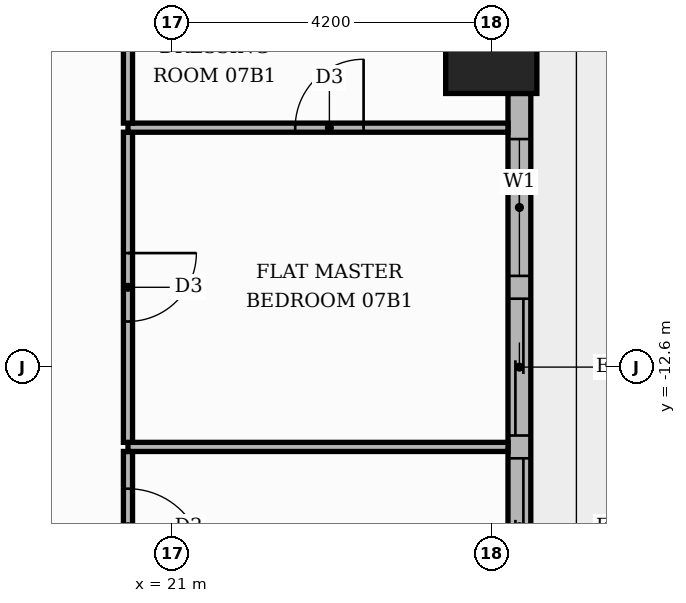
"""IFC4 building model, lengths in metres.
Left out: names, types, materials, properties, quantities, classifications, styles, units other than length and angle.
Written with IfcOpenShell. Run it as: python <this file> out.ifc"""

import sys

from ifc_helpers import new_model, si_unit, direction, frame, frame_2d, origin, origin_2d, place, context, subcontext, project, spatial, rectangle, extrude, element, fill, save


model = new_model("IFC4")
c1 = context("Model", 3, precision=1e-05, world=origin(), true_north=direction((0.0, 1.0)))
c2 = subcontext(c1, "Body", "Model", "MODEL_VIEW")
j1 = project(units=[si_unit("LENGTHUNIT", "METRE"), si_unit("PLANEANGLEUNIT", "RADIAN")], contexts=[c1])
p1 = place(None, origin())
s1 = spatial("IfcSite", under=j1, at=p1, CompositionType="ELEMENT")
p2 = place(p1, origin())
s2 = spatial("IfcBuilding", under=s1, at=p2, CompositionType="ELEMENT")
p3 = place(p2, frame((0.0, 0.0, 34.8)))
s3 = spatial("IfcBuildingStorey", under=s2, at=p3, CompositionType="ELEMENT", Elevation=34.8)
p4 = place(p3, frame((25.2, -8.4, 0.0), z_axis=(0.0, 0.0, 1.0), x_axis=(1.0, 0.0, 0.0)))
e1 = element("IfcColumn", 1, at=p4, inside=s3, PredefinedType="COLUMN", context=c2, shape_type="SweptSolid", body=[
    extrude(rectangle(XDim=1.2, YDim=1.2, at=origin_2d()), origin(), (0.0, 0.0, 1.0), 3.9),
])
p5 = place(p3, frame((25.57, -16.2, 0.0), z_axis=(0.0, 0.0, 1.0), x_axis=(0.0, 1.0, 0.0)))
e2 = element("IfcWall", 2, at=p5, inside=s3, PredefinedType="STANDARD", context=c2, shape_type="SweptSolid", body=[
    extrude(rectangle(XDim=7.2, YDim=0.3, at=frame_2d((3.6, 0.0))), origin(), (0.0, 0.0, 1.0), 3.48),
])
p6 = place(p5, frame((0.6, 0.0, 0.0)))
e3 = element("IfcOpeningElement", 3, at=p6, cuts=e2, PredefinedType="OPENING", context=c2, shape_type="SweptSolid", body=[
    extrude(rectangle(XDim=1.8, YDim=2.4, at=frame_2d((0.9, 1.2))), frame((0.0, 0.16, 0.0), z_axis=(0.0, -1.0, 0.0), x_axis=(1.0, 0.0, 0.0)), (0.0, 0.0, 1.0), 0.32),
])
p7 = place(p5, frame((2.7, 0.0, 0.0)))
e4 = element("IfcOpeningElement", 4, at=p7, cuts=e2, PredefinedType="OPENING", context=c2, shape_type="SweptSolid", body=[
    extrude(rectangle(XDim=1.8, YDim=2.4, at=frame_2d((0.9, 1.2))), frame((0.0, 0.16, 0.0), z_axis=(0.0, -1.0, 0.0), x_axis=(1.0, 0.0, 0.0)), (0.0, 0.0, 1.0), 0.32),
])
p8 = place(p5, frame((4.8, 0.0, 0.9)))
e5 = element("IfcOpeningElement", 5, at=p8, cuts=e2, PredefinedType="OPENING", context=c2, shape_type="SweptSolid", body=[
    extrude(rectangle(XDim=1.8, YDim=2.1, at=frame_2d((0.9, 1.05))), frame((0.0, 0.16, 0.0), z_axis=(0.0, -1.0, 0.0), x_axis=(1.0, 0.0, 0.0)), (0.0, 0.0, 1.0), 0.32),
])
p9 = place(p3, frame((20.42, -15.69, 0.0), z_axis=(0.0, 0.0, 1.0), x_axis=(0.0, 1.0, 0.0)))
e6 = element("IfcWall", 6, at=p9, inside=s3, PredefinedType="PARTITIONING", context=c2, shape_type="SweptSolid", body=[
    extrude(rectangle(XDim=1.98, YDim=0.12, at=frame_2d((0.99, 0.0))), origin(), (0.0, 0.0, 1.0), 3.48),
])
p10 = place(p9, frame((0.49, 0.0, 0.0)))
e7 = element("IfcOpeningElement", 7, at=p10, cuts=e6, PredefinedType="OPENING", context=c2, shape_type="SweptSolid", body=[
    extrude(rectangle(XDim=1.0, YDim=2.1, at=frame_2d((0.5, 1.05))), frame((0.0, 0.07, 0.0), z_axis=(0.0, -1.0, 0.0), x_axis=(1.0, 0.0, 0.0)), (0.0, 0.0, 1.0), 0.14),
])
p11 = place(p3, frame((20.42, -13.65, 0.0), z_axis=(0.0, 0.0, 1.0), x_axis=(1.0, 0.0, 0.0)))
e8 = element("IfcWall", 8, at=p11, inside=s3, PredefinedType="PARTITIONING", context=c2, shape_type="SweptSolid", body=[
    extrude(rectangle(XDim=5.0, YDim=0.12, at=frame_2d((2.5, 0.0))), origin(), (0.0, 0.0, 1.0), 3.48),
])
p12 = place(p3, frame((20.42, -13.59, 0.0), z_axis=(0.0, 0.0, 1.0), x_axis=(0.0, 1.0, 0.0)))
e9 = element("IfcWall", 9, at=p12, inside=s3, PredefinedType="PARTITIONING", context=c2, shape_type="SweptSolid", body=[
    extrude(rectangle(XDim=4.08, YDim=0.12, at=frame_2d((2.04, 0.0))), origin(), (0.0, 0.0, 1.0), 3.48),
])
p13 = place(p12, frame((1.59, 0.0, 0.0)))
e10 = element("IfcOpeningElement", 10, at=p13, cuts=e9, PredefinedType="OPENING", context=c2, shape_type="SweptSolid", body=[
    extrude(rectangle(XDim=0.9, YDim=2.1, at=frame_2d((0.45, 1.05))), frame((0.0, 0.07, 0.0), z_axis=(0.0, -1.0, 0.0), x_axis=(1.0, 0.0, 0.0)), (0.0, 0.0, 1.0), 0.14),
])
p14 = place(p3, frame((20.42, -9.45, 0.0), z_axis=(0.0, 0.0, 1.0), x_axis=(1.0, 0.0, 0.0)))
e11 = element("IfcWall", 11, at=p14, inside=s3, PredefinedType="PARTITIONING", context=c2, shape_type="SweptSolid", body=[
    extrude(rectangle(XDim=5.0, YDim=0.12, at=frame_2d((2.5, 0.0))), origin(), (0.0, 0.0, 1.0), 3.48),
])
p15 = place(p14, frame((2.2, 0.0, 0.0)))
e12 = element("IfcOpeningElement", 12, at=p15, cuts=e11, PredefinedType="OPENING", context=c2, shape_type="SweptSolid", body=[
    extrude(rectangle(XDim=0.9, YDim=2.1, at=frame_2d((0.45, 1.05))), frame((0.0, 0.07, 0.0), z_axis=(0.0, -1.0, 0.0), x_axis=(1.0, 0.0, 0.0)), (0.0, 0.0, 1.0), 0.14),
])
p16 = place(p3, frame((20.42, -9.39, 0.0), z_axis=(0.0, 0.0, 1.0), x_axis=(0.0, 1.0, 0.0)))
e13 = element("IfcWall", 13, at=p16, inside=s3, PredefinedType="PARTITIONING", context=c2, shape_type="SweptSolid", body=[
    extrude(rectangle(XDim=1.98, YDim=0.12, at=frame_2d((0.99, 0.0))), origin(), (0.0, 0.0, 1.0), 3.48),
])
p17 = place(p6, origin())
e14 = element("IfcDoor", 14, at=p17, inside=s3, OperationType="SLIDING_TO_LEFT", PredefinedType="DOOR", context=c2, shape_type="SweptSolid", body=[
    extrude(rectangle(XDim=1.8, YDim=2.4, at=frame_2d((0.9, 1.2))), frame((0.0, 0.025, 0.0), z_axis=(0.0, -1.0, 0.0), x_axis=(1.0, 0.0, 0.0)), (0.0, 0.0, 1.0), 0.05),
])
fill(e3, e14)
p18 = place(p7, origin())
e15 = element("IfcDoor", 15, at=p18, inside=s3, OperationType="SLIDING_TO_RIGHT", PredefinedType="DOOR", context=c2, shape_type="SweptSolid", body=[
    extrude(rectangle(XDim=1.8, YDim=2.4, at=frame_2d((0.9, 1.2))), frame((0.0, 0.025, 0.0), z_axis=(0.0, -1.0, 0.0), x_axis=(1.0, 0.0, 0.0)), (0.0, 0.0, 1.0), 0.05),
])
fill(e4, e15)
p19 = place(p8, origin())
e16 = element("IfcWindow", 16, at=p19, inside=s3, PartitioningType="SINGLE_PANEL", PredefinedType="WINDOW", context=c2, shape_type="SweptSolid", body=[
    extrude(rectangle(XDim=1.8, YDim=2.1, at=frame_2d((0.9, 1.05))), frame((0.0, 0.03, 0.0), z_axis=(0.0, -1.0, 0.0), x_axis=(1.0, 0.0, 0.0)), (0.0, 0.0, 1.0), 0.06),
])
fill(e5, e16)
p20 = place(p10, frame((1.0, 0.0, 0.0), z_axis=(0.0, 0.0, 1.0), x_axis=(-1.0, 0.0, 0.0)))
e17 = element("IfcDoor", 17, at=p20, inside=s3, OperationType="SINGLE_SWING_LEFT", PredefinedType="DOOR", context=c2, shape_type="SweptSolid", body=[
    extrude(rectangle(XDim=1.0, YDim=2.1, at=frame_2d((0.5, 1.05))), frame((0.0, 0.025, 0.0), z_axis=(0.0, -1.0, 0.0), x_axis=(1.0, 0.0, 0.0)), (0.0, 0.0, 1.0), 0.05),
])
fill(e7, e17)
p21 = place(p13, frame((0.9, 0.0, 0.0), z_axis=(0.0, 0.0, 1.0), x_axis=(-1.0, 0.0, 0.0)))
e18 = element("IfcDoor", 18, at=p21, inside=s3, OperationType="SINGLE_SWING_RIGHT", PredefinedType="DOOR", context=c2, shape_type="SweptSolid", body=[
    extrude(rectangle(XDim=0.9, YDim=2.1, at=frame_2d((0.45, 1.05))), frame((0.0, 0.025, 0.0), z_axis=(0.0, -1.0, 0.0), x_axis=(1.0, 0.0, 0.0)), (0.0, 0.0, 1.0), 0.05),
])
fill(e10, e18)
p22 = place(p15, origin())
e19 = element("IfcDoor", 19, at=p22, inside=s3, OperationType="SINGLE_SWING_RIGHT", PredefinedType="DOOR", context=c2, shape_type="SweptSolid", body=[
    extrude(rectangle(XDim=0.9, YDim=2.1, at=frame_2d((0.45, 1.05))), frame((0.0, 0.025, 0.0), z_axis=(0.0, -1.0, 0.0), x_axis=(1.0, 0.0, 0.0)), (0.0, 0.0, 1.0), 0.05),
])
fill(e12, e19)
save(model, sys.argv[1])
